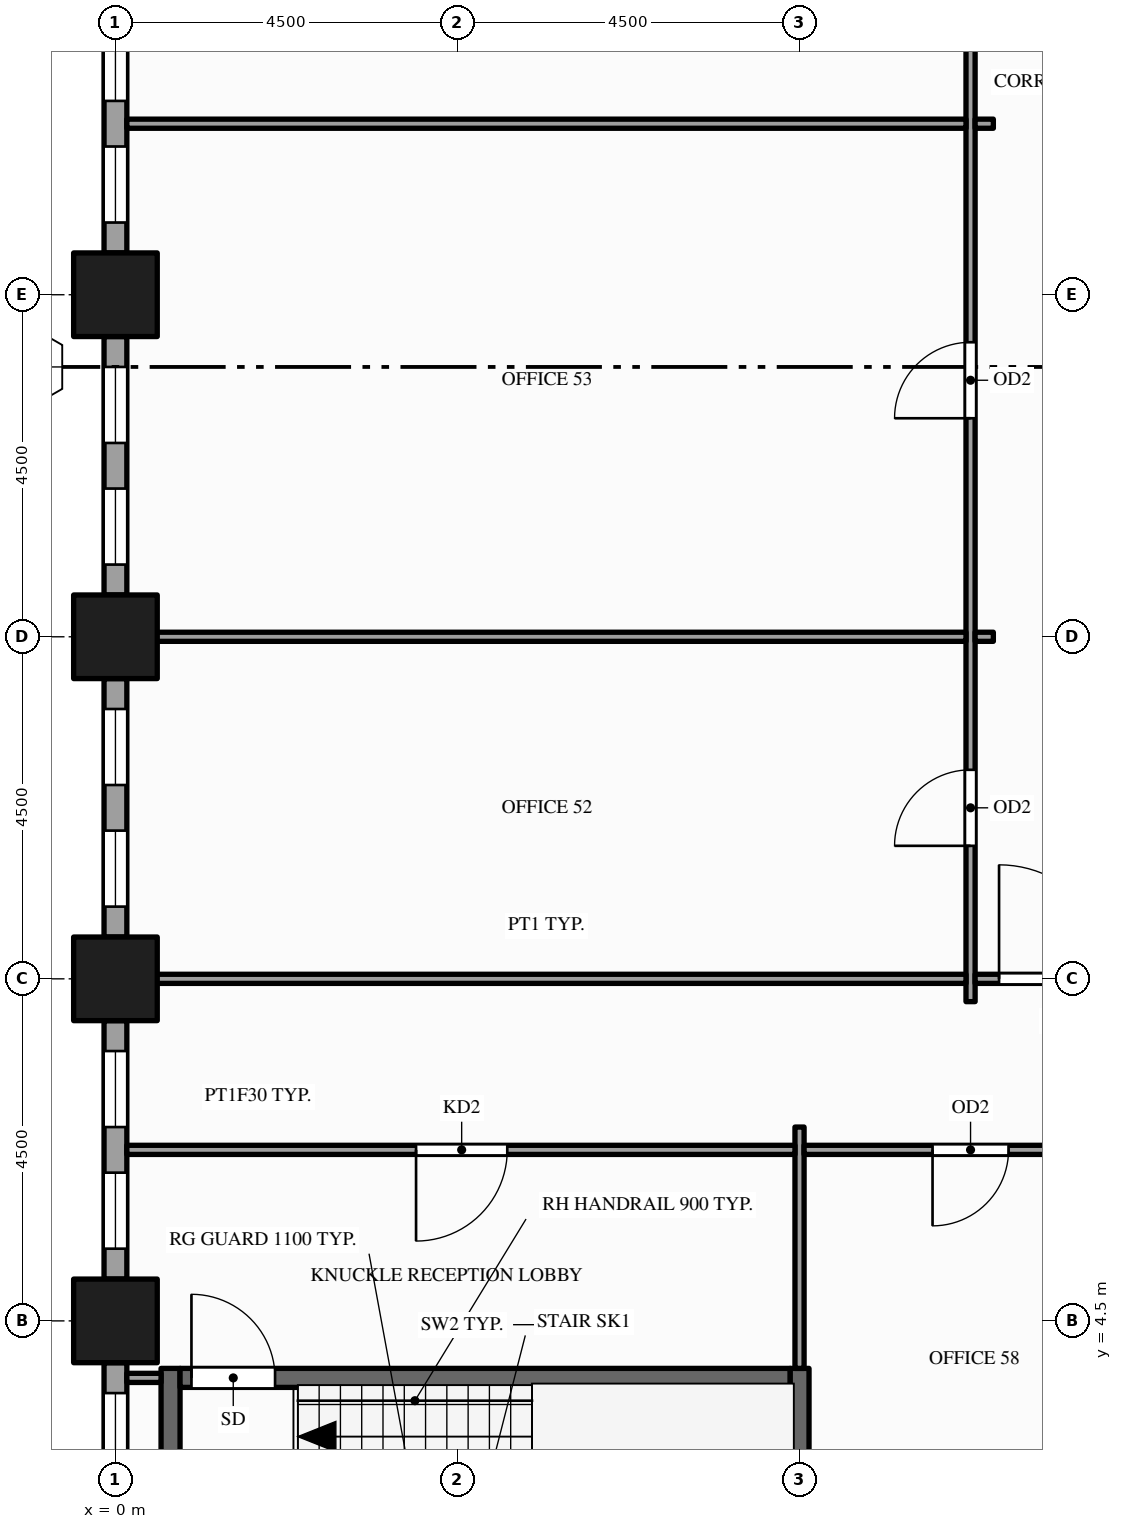
"""IFC4 building model, lengths in metres.
Left out: names, types, materials, properties, quantities, classifications, styles, units other than length and angle.
Written with IfcOpenShell. Run it as: python <this file> out.ifc"""

import sys

from ifc_helpers import new_model, si_unit, direction, frame, frame_2d, origin, origin_2d, place, context, subcontext, project, spatial, rectangle, hollow_rectangle, extrude, element, fill, save


model = new_model("IFC4")
c1 = context("Model", 3, precision=1e-05, world=origin(), true_north=direction((0.0, 1.0)))
c2 = subcontext(c1, "Body", "Model", "MODEL_VIEW")
j1 = project(units=[si_unit("LENGTHUNIT", "METRE"), si_unit("PLANEANGLEUNIT", "RADIAN")], contexts=[c1])
p1 = place(None, origin())
s1 = spatial("IfcSite", under=j1, at=p1, CompositionType="ELEMENT")
p2 = place(p1, origin())
s2 = spatial("IfcBuilding", under=s1, at=p2, CompositionType="ELEMENT")
p3 = place(p2, frame((0.0, 0.0, 49.0)))
s3 = spatial("IfcBuildingStorey", under=s2, at=p3, CompositionType="ELEMENT", Elevation=49.0)
for number, where, z_axis, x_axis in (
    (1, (0.0, 4.5, -0.15), (0.0, 0.0, 1.0), (1.0, 0.0, 0.0)),
    (2, (0.0, 9.0, -0.15), (0.0, 0.0, 1.0), (1.0, 0.0, 0.0)),
    (3, (0.0, 13.5, -0.15), (0.0, 0.0, 1.0), (1.0, 0.0, 0.0)),
    (4, (0.0, 18.0, -0.15), (0.0, 0.0, 1.0), (1.0, 0.0, 0.0)),
):
    element("IfcColumn", number, at=place(p3, frame(where, z_axis=z_axis, x_axis=x_axis)), inside=s3, PredefinedType="COLUMN", context=c2, shape_type="SweptSolid", body=[
        extrude(hollow_rectangle(XDim=1.1, YDim=1.1, WallThickness=0.06, at=origin_2d()), origin(), (0.0, 0.0, 1.0), 4.0),
    ])
p4 = place(p3, frame((0.0, 21.95, 0.0), z_axis=(0.0, 0.0, 1.0), x_axis=(0.0, -1.0, 0.0)))
e5 = element("IfcWall", 5, at=p4, inside=s3, PredefinedType="STANDARD", context=c2, shape_type="SweptSolid", body=[
    extrude(rectangle(XDim=3.4, YDim=0.3, at=frame_2d((1.7, 0.0))), origin(), (0.0, 0.0, 1.0), 3.144),
])
p5 = place(p4, frame((0.4, 0.0, 0.9)))
e6 = element("IfcOpeningElement", 6, at=p5, cuts=e5, PredefinedType="OPENING", context=c2, shape_type="SweptSolid", body=[
    extrude(rectangle(XDim=1.0, YDim=2.0, at=frame_2d((0.5, 1.0))), frame((0.0, 0.16, 0.0), z_axis=(0.0, -1.0, 0.0), x_axis=(1.0, 0.0, 0.0)), (0.0, 0.0, 1.0), 0.32),
])
p6 = place(p4, frame((2.0, 0.0, 0.9)))
e7 = element("IfcOpeningElement", 7, at=p6, cuts=e5, PredefinedType="OPENING", context=c2, shape_type="SweptSolid", body=[
    extrude(rectangle(XDim=1.0, YDim=2.0, at=frame_2d((0.5, 1.0))), frame((0.0, 0.16, 0.0), z_axis=(0.0, -1.0, 0.0), x_axis=(1.0, 0.0, 0.0)), (0.0, 0.0, 1.0), 0.32),
])
p7 = place(p3, frame((0.0, 17.45, 0.0), z_axis=(0.0, 0.0, 1.0), x_axis=(0.0, -1.0, 0.0)))
e8 = element("IfcWall", 8, at=p7, inside=s3, PredefinedType="STANDARD", context=c2, shape_type="SweptSolid", body=[
    extrude(rectangle(XDim=3.4, YDim=0.3, at=frame_2d((1.7, 0.0))), origin(), (0.0, 0.0, 1.0), 3.144),
])
p8 = place(p7, frame((0.4, 0.0, 0.9)))
e9 = element("IfcOpeningElement", 9, at=p8, cuts=e8, PredefinedType="OPENING", context=c2, shape_type="SweptSolid", body=[
    extrude(rectangle(XDim=1.0, YDim=2.0, at=frame_2d((0.5, 1.0))), frame((0.0, 0.16, 0.0), z_axis=(0.0, -1.0, 0.0), x_axis=(1.0, 0.0, 0.0)), (0.0, 0.0, 1.0), 0.32),
])
p9 = place(p7, frame((2.0, 0.0, 0.9)))
e10 = element("IfcOpeningElement", 10, at=p9, cuts=e8, PredefinedType="OPENING", context=c2, shape_type="SweptSolid", body=[
    extrude(rectangle(XDim=1.0, YDim=2.0, at=frame_2d((0.5, 1.0))), frame((0.0, 0.16, 0.0), z_axis=(0.0, -1.0, 0.0), x_axis=(1.0, 0.0, 0.0)), (0.0, 0.0, 1.0), 0.32),
])
p10 = place(p3, frame((0.0, 12.95, 0.0), z_axis=(0.0, 0.0, 1.0), x_axis=(0.0, -1.0, 0.0)))
e11 = element("IfcWall", 11, at=p10, inside=s3, PredefinedType="STANDARD", context=c2, shape_type="SweptSolid", body=[
    extrude(rectangle(XDim=3.4, YDim=0.3, at=frame_2d((1.7, 0.0))), origin(), (0.0, 0.0, 1.0), 3.144),
])
p11 = place(p10, frame((0.4, 0.0, 0.9)))
e12 = element("IfcOpeningElement", 12, at=p11, cuts=e11, PredefinedType="OPENING", context=c2, shape_type="SweptSolid", body=[
    extrude(rectangle(XDim=1.0, YDim=2.0, at=frame_2d((0.5, 1.0))), frame((0.0, 0.16, 0.0), z_axis=(0.0, -1.0, 0.0), x_axis=(1.0, 0.0, 0.0)), (0.0, 0.0, 1.0), 0.32),
])
p12 = place(p10, frame((2.0, 0.0, 0.9)))
e13 = element("IfcOpeningElement", 13, at=p12, cuts=e11, PredefinedType="OPENING", context=c2, shape_type="SweptSolid", body=[
    extrude(rectangle(XDim=1.0, YDim=2.0, at=frame_2d((0.5, 1.0))), frame((0.0, 0.16, 0.0), z_axis=(0.0, -1.0, 0.0), x_axis=(1.0, 0.0, 0.0)), (0.0, 0.0, 1.0), 0.32),
])
p13 = place(p3, frame((0.0, 8.45, 0.0), z_axis=(0.0, 0.0, 1.0), x_axis=(0.0, -1.0, 0.0)))
e14 = element("IfcWall", 14, at=p13, inside=s3, PredefinedType="STANDARD", context=c2, shape_type="SweptSolid", body=[
    extrude(rectangle(XDim=3.4, YDim=0.3, at=frame_2d((1.7, 0.0))), origin(), (0.0, 0.0, 1.0), 3.144),
])
p14 = place(p13, frame((0.4, 0.0, 0.9)))
e15 = element("IfcOpeningElement", 15, at=p14, cuts=e14, PredefinedType="OPENING", context=c2, shape_type="SweptSolid", body=[
    extrude(rectangle(XDim=1.0, YDim=2.0, at=frame_2d((0.5, 1.0))), frame((0.0, 0.16, 0.0), z_axis=(0.0, -1.0, 0.0), x_axis=(1.0, 0.0, 0.0)), (0.0, 0.0, 1.0), 0.32),
])
p15 = place(p13, frame((2.0, 0.0, 0.9)))
e16 = element("IfcOpeningElement", 16, at=p15, cuts=e14, PredefinedType="OPENING", context=c2, shape_type="SweptSolid", body=[
    extrude(rectangle(XDim=1.0, YDim=2.0, at=frame_2d((0.5, 1.0))), frame((0.0, 0.16, 0.0), z_axis=(0.0, -1.0, 0.0), x_axis=(1.0, 0.0, 0.0)), (0.0, 0.0, 1.0), 0.32),
])
p16 = place(p3, frame((0.0, 3.95, 0.0), z_axis=(0.0, 0.0, 1.0), x_axis=(0.0, -1.0, 0.0)))
e17 = element("IfcWall", 17, at=p16, inside=s3, PredefinedType="STANDARD", context=c2, shape_type="SweptSolid", body=[
    extrude(rectangle(XDim=3.4, YDim=0.3, at=frame_2d((1.7, 0.0))), origin(), (0.0, 0.0, 1.0), 3.144),
])
p17 = place(p16, frame((0.4, 0.0, 0.9)))
e18 = element("IfcOpeningElement", 18, at=p17, cuts=e17, PredefinedType="OPENING", context=c2, shape_type="SweptSolid", body=[
    extrude(rectangle(XDim=1.0, YDim=2.0, at=frame_2d((0.5, 1.0))), frame((0.0, 0.16, 0.0), z_axis=(0.0, -1.0, 0.0), x_axis=(1.0, 0.0, 0.0)), (0.0, 0.0, 1.0), 0.32),
])
p18 = place(p16, frame((2.0, 0.0, 0.9)))
e19 = element("IfcOpeningElement", 19, at=p18, cuts=e17, PredefinedType="OPENING", context=c2, shape_type="SweptSolid", body=[
    extrude(rectangle(XDim=1.0, YDim=2.0, at=frame_2d((0.5, 1.0))), frame((0.0, 0.16, 0.0), z_axis=(0.0, -1.0, 0.0), x_axis=(1.0, 0.0, 0.0)), (0.0, 0.0, 1.0), 0.32),
])
p19 = place(p3, frame((0.725, 0.6, 0.0), z_axis=(0.0, 0.0, 1.0), x_axis=(0.0, 1.0, 0.0)))
e20 = element("IfcWall", 20, at=p19, inside=s3, PredefinedType="SHEAR", context=c2, shape_type="SweptSolid", body=[
    extrude(rectangle(XDim=3.275, YDim=0.25, at=frame_2d((1.637, 0.0))), origin(), (0.0, 0.0, 1.0), 3.85),
])
p20 = place(p3, frame((9.0, 0.55, 0.0), z_axis=(0.0, 0.0, 1.0), x_axis=(0.0, 1.0, 0.0)))
e21 = element("IfcWall", 21, at=p20, inside=s3, PredefinedType="SHEAR", context=c2, shape_type="SweptSolid", body=[
    extrude(rectangle(XDim=3.325, YDim=0.25, at=frame_2d((1.663, 0.0))), origin(), (0.0, 0.0, 1.0), 3.85),
])
p21 = place(p3, frame((9.0, 3.875, 0.0), z_axis=(0.0, 0.0, 1.0), x_axis=(0.0, 1.0, 0.0)))
e22 = element("IfcWall", 22, at=p21, inside=s3, PredefinedType="PARTITIONING", context=c2, shape_type="SweptSolid", body=[
    extrude(rectangle(XDim=3.175, YDim=0.12, at=frame_2d((1.587, 0.0))), origin(), (0.0, 0.0, 1.0), 2.938),
])
p22 = place(p3, frame((11.25, 8.7, 0.0), z_axis=(0.0, 0.0, 1.0), x_axis=(0.0, 1.0, 0.0)))
e23 = element("IfcWall", 23, at=p22, inside=s3, PredefinedType="PARTITIONING", context=c2, shape_type="SweptSolid", body=[
    extrude(rectangle(XDim=23.1, YDim=0.12, at=frame_2d((11.55, 0.0))), origin(), (0.0, 0.0, 1.0), 2.6),
])
p23 = place(p22, frame((2.05, 0.0, 0.0)))
e24 = element("IfcOpeningElement", 24, at=p23, cuts=e23, PredefinedType="OPENING", context=c2, shape_type="SweptSolid", body=[
    extrude(rectangle(XDim=1.0, YDim=2.1, at=frame_2d((0.5, 1.05))), frame((0.0, 0.07, 0.0), z_axis=(0.0, -1.0, 0.0), x_axis=(1.0, 0.0, 0.0)), (0.0, 0.0, 1.0), 0.14),
])
p24 = place(p22, frame((7.675, 0.0, 0.0)))
e25 = element("IfcOpeningElement", 25, at=p24, cuts=e23, PredefinedType="OPENING", context=c2, shape_type="SweptSolid", body=[
    extrude(rectangle(XDim=1.0, YDim=2.1, at=frame_2d((0.5, 1.05))), frame((0.0, 0.07, 0.0), z_axis=(0.0, -1.0, 0.0), x_axis=(1.0, 0.0, 0.0)), (0.0, 0.0, 1.0), 0.14),
])
p25 = place(p22, frame((14.055, 0.0, 0.0)))
e26 = element("IfcOpeningElement", 26, at=p25, cuts=e23, PredefinedType="OPENING", context=c2, shape_type="SweptSolid", body=[
    extrude(rectangle(XDim=1.8, YDim=2.1, at=frame_2d((0.9, 1.05))), frame((0.0, 0.07, 0.0), z_axis=(0.0, -1.0, 0.0), x_axis=(1.0, 0.0, 0.0)), (0.0, 0.0, 1.0), 0.14),
])
p26 = place(p3, frame((0.15, 3.75, 0.0), z_axis=(0.0, 0.0, 1.0), x_axis=(1.0, 0.0, 0.0)))
e27 = element("IfcWall", 27, at=p26, inside=s3, PredefinedType="PARTITIONING", context=c2, shape_type="SweptSolid", body=[
    extrude(rectangle(XDim=0.45, YDim=0.12, at=frame_2d((0.225, 0.0))), origin(), (0.0, 0.0, 1.0), 3.144),
])
p27 = place(p3, frame((0.85, 3.75, 0.0), z_axis=(0.0, 0.0, 1.0), x_axis=(1.0, 0.0, 0.0)))
e28 = element("IfcWall", 28, at=p27, inside=s3, PredefinedType="SHEAR", context=c2, shape_type="SweptSolid", body=[
    extrude(rectangle(XDim=8.025, YDim=0.25, at=frame_2d((4.012, 0.0))), origin(), (0.0, 0.0, 1.0), 3.85),
])
p28 = place(p27, frame((0.15, 0.0, 0.0)))
e29 = element("IfcOpeningElement", 29, at=p28, cuts=e28, PredefinedType="OPENING", context=c2, shape_type="SweptSolid", body=[
    extrude(rectangle(XDim=1.1, YDim=2.1, at=frame_2d((0.55, 1.05))), frame((0.0, 0.135, 0.0), z_axis=(0.0, -1.0, 0.0), x_axis=(1.0, 0.0, 0.0)), (0.0, 0.0, 1.0), 0.27),
])
p29 = place(p3, frame((0.15, 6.75, 0.0), z_axis=(0.0, 0.0, 1.0), x_axis=(1.0, 0.0, 0.0)))
e30 = element("IfcWall", 30, at=p29, inside=s3, PredefinedType="PARTITIONING", context=c2, shape_type="SweptSolid", body=[
    extrude(rectangle(XDim=8.79, YDim=0.12, at=frame_2d((4.395, 0.0))), origin(), (0.0, 0.0, 1.0), 2.938),
])
p30 = place(p29, frame((3.805, 0.0, 0.0)))
e31 = element("IfcOpeningElement", 31, at=p30, cuts=e30, PredefinedType="OPENING", context=c2, shape_type="SweptSolid", body=[
    extrude(rectangle(XDim=1.2, YDim=2.1, at=frame_2d((0.6, 1.05))), frame((0.0, 0.07, 0.0), z_axis=(0.0, -1.0, 0.0), x_axis=(1.0, 0.0, 0.0)), (0.0, 0.0, 1.0), 0.14),
])
p31 = place(p3, frame((9.06, 6.75, 0.0), z_axis=(0.0, 0.0, 1.0), x_axis=(1.0, 0.0, 0.0)))
e32 = element("IfcWall", 32, at=p31, inside=s3, PredefinedType="PARTITIONING", context=c2, shape_type="SweptSolid", body=[
    extrude(rectangle(XDim=4.38, YDim=0.12, at=frame_2d((2.19, 0.0))), origin(), (0.0, 0.0, 1.0), 2.938),
])
p32 = place(p31, frame((1.69, 0.0, 0.0)))
e33 = element("IfcOpeningElement", 33, at=p32, cuts=e32, PredefinedType="OPENING", context=c2, shape_type="SweptSolid", body=[
    extrude(rectangle(XDim=1.0, YDim=2.1, at=frame_2d((0.5, 1.05))), frame((0.0, 0.07, 0.0), z_axis=(0.0, -1.0, 0.0), x_axis=(1.0, 0.0, 0.0)), (0.0, 0.0, 1.0), 0.14),
])
p33 = place(p3, frame((0.15, 9.0, 0.0), z_axis=(0.0, 0.0, 1.0), x_axis=(1.0, 0.0, 0.0)))
e34 = element("IfcWall", 34, at=p33, inside=s3, PredefinedType="PARTITIONING", context=c2, shape_type="SweptSolid", body=[
    extrude(rectangle(XDim=11.04, YDim=0.12, at=frame_2d((5.52, 0.0))), origin(), (0.0, 0.0, 1.0), 2.938),
])
p34 = place(p3, frame((11.31, 9.0, 0.0), z_axis=(0.0, 0.0, 1.0), x_axis=(1.0, 0.0, 0.0)))
e35 = element("IfcWall", 35, at=p34, inside=s3, PredefinedType="PARTITIONING", context=c2, shape_type="SweptSolid", body=[
    extrude(rectangle(XDim=2.13, YDim=0.12, at=frame_2d((1.065, 0.0))), origin(), (0.0, 0.0, 1.0), 2.938),
])
p35 = place(p34, frame((0.315, 0.0, 0.0)))
e36 = element("IfcOpeningElement", 36, at=p35, cuts=e35, PredefinedType="OPENING", context=c2, shape_type="SweptSolid", body=[
    extrude(rectangle(XDim=1.5, YDim=2.1, at=frame_2d((0.75, 1.05))), frame((0.0, 0.07, 0.0), z_axis=(0.0, -1.0, 0.0), x_axis=(1.0, 0.0, 0.0)), (0.0, 0.0, 1.0), 0.14),
])
p36 = place(p3, frame((0.15, 13.5, 0.0), z_axis=(0.0, 0.0, 1.0), x_axis=(1.0, 0.0, 0.0)))
e37 = element("IfcWall", 37, at=p36, inside=s3, PredefinedType="PARTITIONING", context=c2, shape_type="SweptSolid", body=[
    extrude(rectangle(XDim=11.04, YDim=0.12, at=frame_2d((5.52, 0.0))), origin(), (0.0, 0.0, 1.0), 2.938),
])
p37 = place(p3, frame((11.31, 13.5, 0.0), z_axis=(0.0, 0.0, 1.0), x_axis=(1.0, 0.0, 0.0)))
e38 = element("IfcWall", 38, at=p37, inside=s3, PredefinedType="PARTITIONING", context=c2, shape_type="SweptSolid", body=[
    extrude(rectangle(XDim=0.24, YDim=0.12, at=frame_2d((0.12, 0.0))), origin(), (0.0, 0.0, 1.0), 2.938),
])
p38 = place(p3, frame((0.15, 20.25, 0.0), z_axis=(0.0, 0.0, 1.0), x_axis=(1.0, 0.0, 0.0)))
e39 = element("IfcWall", 39, at=p38, inside=s3, PredefinedType="PARTITIONING", context=c2, shape_type="SweptSolid", body=[
    extrude(rectangle(XDim=11.04, YDim=0.12, at=frame_2d((5.52, 0.0))), origin(), (0.0, 0.0, 1.0), 2.938),
])
p39 = place(p3, frame((11.31, 20.25, 0.0), z_axis=(0.0, 0.0, 1.0), x_axis=(1.0, 0.0, 0.0)))
e40 = element("IfcWall", 40, at=p39, inside=s3, PredefinedType="PARTITIONING", context=c2, shape_type="SweptSolid", body=[
    extrude(rectangle(XDim=0.24, YDim=0.12, at=frame_2d((0.12, 0.0))), origin(), (0.0, 0.0, 1.0), 2.938),
])
p40 = place(p5, origin())
e41 = element("IfcWindow", 41, at=p40, inside=s3, PartitioningType="SINGLE_PANEL", PredefinedType="WINDOW", context=c2, shape_type="SweptSolid", body=[
    extrude(rectangle(XDim=1.0, YDim=2.0, at=frame_2d((0.5, 1.0))), frame((0.0, 0.03, 0.0), z_axis=(0.0, -1.0, 0.0), x_axis=(1.0, 0.0, 0.0)), (0.0, 0.0, 1.0), 0.06),
])
fill(e6, e41)
p41 = place(p6, origin())
e42 = element("IfcWindow", 42, at=p41, inside=s3, PartitioningType="SINGLE_PANEL", PredefinedType="WINDOW", context=c2, shape_type="SweptSolid", body=[
    extrude(rectangle(XDim=1.0, YDim=2.0, at=frame_2d((0.5, 1.0))), frame((0.0, 0.03, 0.0), z_axis=(0.0, -1.0, 0.0), x_axis=(1.0, 0.0, 0.0)), (0.0, 0.0, 1.0), 0.06),
])
fill(e7, e42)
p42 = place(p8, origin())
e43 = element("IfcWindow", 43, at=p42, inside=s3, PartitioningType="SINGLE_PANEL", PredefinedType="WINDOW", context=c2, shape_type="SweptSolid", body=[
    extrude(rectangle(XDim=1.0, YDim=2.0, at=frame_2d((0.5, 1.0))), frame((0.0, 0.03, 0.0), z_axis=(0.0, -1.0, 0.0), x_axis=(1.0, 0.0, 0.0)), (0.0, 0.0, 1.0), 0.06),
])
fill(e9, e43)
p43 = place(p9, origin())
e44 = element("IfcWindow", 44, at=p43, inside=s3, PartitioningType="SINGLE_PANEL", PredefinedType="WINDOW", context=c2, shape_type="SweptSolid", body=[
    extrude(rectangle(XDim=1.0, YDim=2.0, at=frame_2d((0.5, 1.0))), frame((0.0, 0.03, 0.0), z_axis=(0.0, -1.0, 0.0), x_axis=(1.0, 0.0, 0.0)), (0.0, 0.0, 1.0), 0.06),
])
fill(e10, e44)
p44 = place(p11, origin())
e45 = element("IfcWindow", 45, at=p44, inside=s3, PartitioningType="SINGLE_PANEL", PredefinedType="WINDOW", context=c2, shape_type="SweptSolid", body=[
    extrude(rectangle(XDim=1.0, YDim=2.0, at=frame_2d((0.5, 1.0))), frame((0.0, 0.03, 0.0), z_axis=(0.0, -1.0, 0.0), x_axis=(1.0, 0.0, 0.0)), (0.0, 0.0, 1.0), 0.06),
])
fill(e12, e45)
p45 = place(p12, origin())
e46 = element("IfcWindow", 46, at=p45, inside=s3, PartitioningType="SINGLE_PANEL", PredefinedType="WINDOW", context=c2, shape_type="SweptSolid", body=[
    extrude(rectangle(XDim=1.0, YDim=2.0, at=frame_2d((0.5, 1.0))), frame((0.0, 0.03, 0.0), z_axis=(0.0, -1.0, 0.0), x_axis=(1.0, 0.0, 0.0)), (0.0, 0.0, 1.0), 0.06),
])
fill(e13, e46)
p46 = place(p14, origin())
e47 = element("IfcWindow", 47, at=p46, inside=s3, PartitioningType="SINGLE_PANEL", PredefinedType="WINDOW", context=c2, shape_type="SweptSolid", body=[
    extrude(rectangle(XDim=1.0, YDim=2.0, at=frame_2d((0.5, 1.0))), frame((0.0, 0.03, 0.0), z_axis=(0.0, -1.0, 0.0), x_axis=(1.0, 0.0, 0.0)), (0.0, 0.0, 1.0), 0.06),
])
fill(e15, e47)
p47 = place(p15, origin())
e48 = element("IfcWindow", 48, at=p47, inside=s3, PartitioningType="SINGLE_PANEL", PredefinedType="WINDOW", context=c2, shape_type="SweptSolid", body=[
    extrude(rectangle(XDim=1.0, YDim=2.0, at=frame_2d((0.5, 1.0))), frame((0.0, 0.03, 0.0), z_axis=(0.0, -1.0, 0.0), x_axis=(1.0, 0.0, 0.0)), (0.0, 0.0, 1.0), 0.06),
])
fill(e16, e48)
p48 = place(p17, origin())
e49 = element("IfcWindow", 49, at=p48, inside=s3, PartitioningType="SINGLE_PANEL", PredefinedType="WINDOW", context=c2, shape_type="SweptSolid", body=[
    extrude(rectangle(XDim=1.0, YDim=2.0, at=frame_2d((0.5, 1.0))), frame((0.0, 0.03, 0.0), z_axis=(0.0, -1.0, 0.0), x_axis=(1.0, 0.0, 0.0)), (0.0, 0.0, 1.0), 0.06),
])
fill(e18, e49)
p49 = place(p28, origin())
e50 = element("IfcDoor", 50, at=p49, inside=s3, OperationType="SINGLE_SWING_LEFT", PredefinedType="DOOR", context=c2, shape_type="SweptSolid", body=[
    extrude(rectangle(XDim=1.1, YDim=2.1, at=frame_2d((0.55, 1.05))), frame((0.0, 0.025, 0.0), z_axis=(0.0, -1.0, 0.0), x_axis=(1.0, 0.0, 0.0)), (0.0, 0.0, 1.0), 0.05),
])
fill(e29, e50)
p50 = place(p30, origin())
e51 = element("IfcDoor", 51, at=p50, inside=s3, OperationType="SINGLE_SWING_LEFT", PredefinedType="DOOR", context=c2, shape_type="SweptSolid", body=[
    extrude(rectangle(XDim=1.2, YDim=2.1, at=frame_2d((0.6, 1.05))), frame((0.0, 0.025, 0.0), z_axis=(0.0, -1.0, 0.0), x_axis=(1.0, 0.0, 0.0)), (0.0, 0.0, 1.0), 0.05),
])
fill(e31, e51)
p51 = place(p32, origin())
e52 = element("IfcDoor", 52, at=p51, inside=s3, OperationType="SINGLE_SWING_LEFT", PredefinedType="DOOR", context=c2, shape_type="SweptSolid", body=[
    extrude(rectangle(XDim=1.0, YDim=2.1, at=frame_2d((0.5, 1.05))), frame((0.0, 0.025, 0.0), z_axis=(0.0, -1.0, 0.0), x_axis=(1.0, 0.0, 0.0)), (0.0, 0.0, 1.0), 0.05),
])
fill(e33, e52)
p52 = place(p35, origin())
e53 = element("IfcDoor", 53, at=p52, inside=s3, OperationType="SINGLE_SWING_LEFT", PredefinedType="DOOR", context=c2, shape_type="SweptSolid", body=[
    extrude(rectangle(XDim=1.5, YDim=2.1, at=frame_2d((0.75, 1.05))), frame((0.0, 0.025, 0.0), z_axis=(0.0, -1.0, 0.0), x_axis=(1.0, 0.0, 0.0)), (0.0, 0.0, 1.0), 0.05),
])
fill(e36, e53)
p53 = place(p23, origin())
e54 = element("IfcDoor", 54, at=p53, inside=s3, OperationType="SINGLE_SWING_LEFT", PredefinedType="DOOR", context=c2, shape_type="SweptSolid", body=[
    extrude(rectangle(XDim=1.0, YDim=2.1, at=frame_2d((0.5, 1.05))), frame((0.0, 0.025, 0.0), z_axis=(0.0, -1.0, 0.0), x_axis=(1.0, 0.0, 0.0)), (0.0, 0.0, 1.0), 0.05),
])
fill(e24, e54)
p54 = place(p24, origin())
e55 = element("IfcDoor", 55, at=p54, inside=s3, OperationType="SINGLE_SWING_LEFT", PredefinedType="DOOR", context=c2, shape_type="SweptSolid", body=[
    extrude(rectangle(XDim=1.0, YDim=2.1, at=frame_2d((0.5, 1.05))), frame((0.0, 0.025, 0.0), z_axis=(0.0, -1.0, 0.0), x_axis=(1.0, 0.0, 0.0)), (0.0, 0.0, 1.0), 0.05),
])
fill(e25, e55)
save(model, sys.argv[1])
